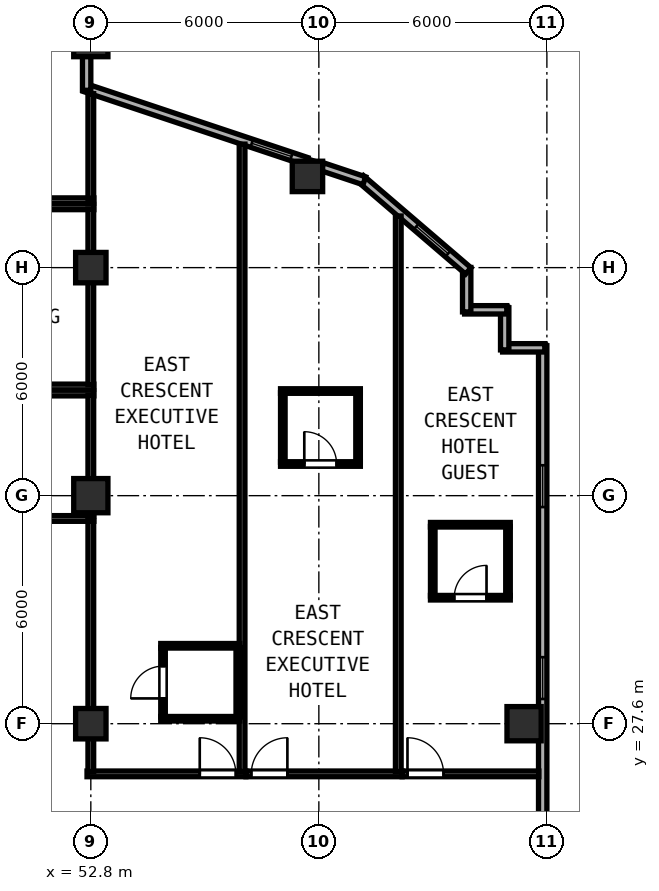
"""IFC4 building model, lengths in metres.
Left out: names, types, materials, properties, quantities, classifications, styles, units other than length and angle.
Written with IfcOpenShell. Run it as: python <this file> out.ifc"""

import sys

from ifc_helpers import new_model, si_unit, direction, frame, frame_2d, origin, origin_2d, place, context, subcontext, project, spatial, rectangle, hollow_rectangle, extrude, element, fill, save


model = new_model("IFC4")
c1 = context("Model", 3, precision=1e-05, world=origin(), true_north=direction((0.0, 1.0)))
c2 = subcontext(c1, "Body", "Model", "MODEL_VIEW")
j1 = project(units=[si_unit("LENGTHUNIT", "METRE"), si_unit("PLANEANGLEUNIT", "RADIAN")], contexts=[c1])
p1 = place(None, origin())
s1 = spatial("IfcSite", under=j1, at=p1, CompositionType="ELEMENT")
p2 = place(p1, origin())
s2 = spatial("IfcBuilding", under=s1, at=p2, CompositionType="ELEMENT")
p3 = place(p2, frame((0.0, 0.0, 191.8)))
s3 = spatial("IfcBuildingStorey", under=s2, at=p3, CompositionType="ELEMENT", Elevation=191.8)
for number, where, z_axis, x_axis in (
    (1, (52.8, 33.6, 0.0), (0.0, 0.0, 1.0), (1.0, 0.0, 0.0)),
    (2, (52.8, 45.6, 0.0), (0.0, 0.0, 1.0), (1.0, 0.0, 0.0)),
    (3, (64.2, 27.6, 0.0), (0.0, 0.0, 1.0), (1.0, 0.0, 0.0)),
):
    element("IfcColumn", number, at=place(p3, frame(where, z_axis=z_axis, x_axis=x_axis)), inside=s3, PredefinedType="COLUMN", context=c2, shape_type="SweptSolid", body=[
        extrude(hollow_rectangle(XDim=0.9, YDim=0.9, WallThickness=0.034, at=origin_2d()), origin(), (0.0, 0.0, 1.0), 3.8),
    ])
for number, where, z_axis, x_axis in (
    (4, (52.8, 27.6, 0.0), (0.0, 0.0, 1.0), (1.0, 0.0, 0.0)),
    (5, (52.8, 39.6, 0.0), (0.0, 0.0, 1.0), (1.0, 0.0, 0.0)),
    (6, (58.5, 42.0, 0.0), (0.0, 0.0, 1.0), (1.0, 0.0, 0.0)),
):
    element("IfcColumn", number, at=place(p3, frame(where, z_axis=z_axis, x_axis=x_axis)), inside=s3, PredefinedType="COLUMN", context=c2, shape_type="SweptSolid", body=[
        extrude(hollow_rectangle(XDim=0.8, YDim=0.8, WallThickness=0.03, at=origin_2d()), origin(), (0.0, 0.0, 1.0), 3.8),
    ])
p4 = place(p3, frame((64.69, 16.4, 0.0), z_axis=(0.0, 0.0, 1.0), x_axis=(0.0, 1.0, 0.0)))
e7 = element("IfcWall", 7, at=p4, inside=s3, PredefinedType="SOLIDWALL", context=c2, shape_type="SweptSolid", body=[
    extrude(rectangle(XDim=21.145, YDim=0.22, at=frame_2d((10.573, 0.0))), origin(), (0.0, 0.0, 1.0), 3.62),
])
p5 = place(p4, frame((1.05, 0.0, 0.85)))
e8 = element("IfcOpeningElement", 8, at=p5, cuts=e7, PredefinedType="OPENING", context=c2, shape_type="SweptSolid", body=[
    extrude(rectangle(XDim=1.1, YDim=1.75, at=frame_2d((0.55, 0.875))), frame((0.0, 0.12, 0.0), z_axis=(0.0, -1.0, 0.0), x_axis=(1.0, 0.0, 0.0)), (0.0, 0.0, 1.0), 0.24),
])
p6 = place(p4, frame((6.1, 0.0, 0.85)))
e9 = element("IfcOpeningElement", 9, at=p6, cuts=e7, PredefinedType="OPENING", context=c2, shape_type="SweptSolid", body=[
    extrude(rectangle(XDim=1.1, YDim=1.75, at=frame_2d((0.55, 0.875))), frame((0.0, 0.12, 0.0), z_axis=(0.0, -1.0, 0.0), x_axis=(1.0, 0.0, 0.0)), (0.0, 0.0, 1.0), 0.24),
])
p7 = place(p4, frame((11.85, 0.0, 0.85)))
e10 = element("IfcOpeningElement", 10, at=p7, cuts=e7, PredefinedType="OPENING", context=c2, shape_type="SweptSolid", body=[
    extrude(rectangle(XDim=1.1, YDim=1.75, at=frame_2d((0.55, 0.875))), frame((0.0, 0.12, 0.0), z_axis=(0.0, -1.0, 0.0), x_axis=(1.0, 0.0, 0.0)), (0.0, 0.0, 1.0), 0.24),
])
p8 = place(p4, frame((16.9, 0.0, 0.85)))
e11 = element("IfcOpeningElement", 11, at=p8, cuts=e7, PredefinedType="OPENING", context=c2, shape_type="SweptSolid", body=[
    extrude(rectangle(XDim=1.1, YDim=1.75, at=frame_2d((0.55, 0.875))), frame((0.0, 0.12, 0.0), z_axis=(0.0, -1.0, 0.0), x_axis=(1.0, 0.0, 0.0)), (0.0, 0.0, 1.0), 0.24),
])
p9 = place(p3, frame((64.745, 37.49, 0.0), z_axis=(0.0, 0.0, 1.0), x_axis=(-1.0, 0.0, 0.0)))
e12 = element("IfcWall", 12, at=p9, inside=s3, PredefinedType="SOLIDWALL", context=c2, shape_type="SweptSolid", body=[
    extrude(rectangle(XDim=1.11, YDim=0.22, at=frame_2d((0.555, 0.0))), origin(), (0.0, 0.0, 1.0), 3.62),
])
p10 = place(p3, frame((63.69, 37.435, 0.0), z_axis=(0.0, 0.0, 1.0), x_axis=(0.0, 1.0, 0.0)))
e13 = element("IfcWall", 13, at=p10, inside=s3, PredefinedType="SOLIDWALL", context=c2, shape_type="SweptSolid", body=[
    extrude(rectangle(XDim=1.11, YDim=0.22, at=frame_2d((0.555, 0.0))), origin(), (0.0, 0.0, 1.0), 3.62),
])
p11 = place(p3, frame((63.745, 38.49, 0.0), z_axis=(0.0, 0.0, 1.0), x_axis=(-1.0, 0.0, 0.0)))
e14 = element("IfcWall", 14, at=p11, inside=s3, PredefinedType="SOLIDWALL", context=c2, shape_type="SweptSolid", body=[
    extrude(rectangle(XDim=1.11, YDim=0.22, at=frame_2d((0.555, 0.0))), origin(), (0.0, 0.0, 1.0), 3.62),
])
p12 = place(p3, frame((62.69, 38.435, 0.0), z_axis=(0.0, 0.0, 1.0), x_axis=(0.0, 1.0, 0.0)))
e15 = element("IfcWall", 15, at=p12, inside=s3, PredefinedType="SOLIDWALL", context=c2, shape_type="SweptSolid", body=[
    extrude(rectangle(XDim=1.169, YDim=0.22, at=frame_2d((0.585, 0.0))), origin(), (0.0, 0.0, 1.0), 3.62),
])
p13 = place(p3, frame((62.732, 39.514, 0.0), z_axis=(0.0, 0.0, 1.0), x_axis=(-0.759251976569, 0.65079677018, 0.0)))
e16 = element("IfcWall", 16, at=p13, inside=s3, PredefinedType="SOLIDWALL", context=c2, shape_type="SweptSolid", body=[
    extrude(rectangle(XDim=3.726, YDim=0.22, at=frame_2d((1.863, 0.0))), origin(), (0.0, 0.0, 1.0), 3.62),
])
p14 = place(p13, frame((0.7, 0.0, 0.85)))
e17 = element("IfcOpeningElement", 17, at=p14, cuts=e16, PredefinedType="OPENING", context=c2, shape_type="SweptSolid", body=[
    extrude(rectangle(XDim=1.1, YDim=1.75, at=frame_2d((0.55, 0.875))), frame((0.0, 0.12, 0.0), z_axis=(0.0, -1.0, 0.0), x_axis=(1.0, 0.0, 0.0)), (0.0, 0.0, 1.0), 0.24),
])
p15 = place(p3, frame((59.997, 41.885, 0.0), z_axis=(0.0, 0.0, 1.0), x_axis=(-0.948662335685, 0.316290646166, 0.0)))
e18 = element("IfcWall", 18, at=p15, inside=s3, PredefinedType="SOLIDWALL", context=c2, shape_type="SweptSolid", body=[
    extrude(rectangle(XDim=1.165, YDim=0.22, at=frame_2d((0.583, 0.0))), origin(), (0.0, 0.0, 1.0), 3.62),
])
p16 = place(p3, frame((58.476, 42.392, 0.0), z_axis=(0.0, 0.0, 1.0), x_axis=(-0.948691231611, 0.316203964339, 0.0)))
e19 = element("IfcWall", 19, at=p16, inside=s3, PredefinedType="SOLIDWALL", context=c2, shape_type="SweptSolid", body=[
    extrude(rectangle(XDim=6.154, YDim=0.22, at=frame_2d((3.077, 0.0))), origin(), (0.0, 0.0, 1.0), 3.215),
])
p17 = place(p16, frame((0.419, 0.0, 0.85)))
e20 = element("IfcOpeningElement", 20, at=p17, cuts=e19, PredefinedType="OPENING", context=c2, shape_type="SweptSolid", body=[
    extrude(rectangle(XDim=1.1, YDim=1.75, at=frame_2d((0.55, 0.875))), frame((0.0, 0.12, 0.0), z_axis=(0.0, -1.0, 0.0), x_axis=(1.0, 0.0, 0.0)), (0.0, 0.0, 1.0), 0.24),
])
p18 = place(p3, frame((52.69, 44.266, 0.0), z_axis=(0.0, 0.0, 1.0), x_axis=(0.0, 1.0, 0.0)))
e21 = element("IfcWall", 21, at=p18, inside=s3, PredefinedType="SOLIDWALL", context=c2, shape_type="SweptSolid", body=[
    extrude(rectangle(XDim=0.892, YDim=0.22, at=frame_2d((0.446, 0.0))), origin(), (0.0, 0.0, 1.0), 3.215),
])
for number, where, z_axis, x_axis in (
    (22, (49.08, 36.3, 0.0), (0.0, 0.0, 1.0), (1.0, 0.0, 0.0)),
    (23, (49.08, 33.0, 0.0), (0.0, 0.0, 1.0), (1.0, 0.0, 0.0)),
):
    element("IfcWall", number, at=place(p3, frame(where, z_axis=z_axis, x_axis=x_axis)), inside=s3, PredefinedType="PARTITIONING", context=c2, shape_type="SweptSolid", body=[
        extrude(rectangle(XDim=3.8, YDim=0.15, at=frame_2d((1.9, 0.0))), origin(), (0.0, 0.0, 1.0), 3.62),
    ])
p19 = place(p3, frame((52.8, 33.06, 0.0), z_axis=(0.0, 0.0, 1.0), x_axis=(0.0, 1.0, 0.0)))
e24 = element("IfcWall", 24, at=p19, inside=s3, PredefinedType="PARTITIONING", context=c2, shape_type="SweptSolid", body=[
    extrude(rectangle(XDim=3.18, YDim=0.15, at=frame_2d((1.59, 0.0))), origin(), (0.0, 0.0, 1.0), 3.215),
])
for number, where, z_axis, x_axis in (
    (25, (49.08, 41.2, 0.0), (0.0, 0.0, 1.0), (1.0, 0.0, 0.0)),
    (26, (49.08, 36.46, 0.0), (0.0, 0.0, 1.0), (1.0, 0.0, 0.0)),
):
    element("IfcWall", number, at=place(p3, frame(where, z_axis=z_axis, x_axis=x_axis)), inside=s3, PredefinedType="PARTITIONING", context=c2, shape_type="SweptSolid", body=[
        extrude(rectangle(XDim=3.8, YDim=0.15, at=frame_2d((1.9, 0.0))), origin(), (0.0, 0.0, 1.0), 3.62),
    ])
p20 = place(p3, frame((52.8, 36.52, 0.0), z_axis=(0.0, 0.0, 1.0), x_axis=(0.0, 1.0, 0.0)))
e27 = element("IfcWall", 27, at=p20, inside=s3, PredefinedType="PARTITIONING", context=c2, shape_type="SweptSolid", body=[
    extrude(rectangle(XDim=4.62, YDim=0.15, at=frame_2d((2.31, 0.0))), origin(), (0.0, 0.0, 1.0), 3.215),
])
p21 = place(p3, frame((49.08, 41.36, 0.0), z_axis=(0.0, 0.0, 1.0), x_axis=(1.0, 0.0, 0.0)))
e28 = element("IfcWall", 28, at=p21, inside=s3, PredefinedType="PARTITIONING", context=c2, shape_type="SweptSolid", body=[
    extrude(rectangle(XDim=3.8, YDim=0.15, at=frame_2d((1.9, 0.0))), origin(), (0.0, 0.0, 1.0), 3.62),
])
p22 = place(p3, frame((52.8, 41.42, 0.0), z_axis=(0.0, 0.0, 1.0), x_axis=(0.0, 1.0, 0.0)))
e29 = element("IfcWall", 29, at=p22, inside=s3, PredefinedType="PARTITIONING", context=c2, shape_type="SweptSolid", body=[
    extrude(rectangle(XDim=2.757, YDim=0.15, at=frame_2d((1.378, 0.0))), origin(), (0.0, 0.0, 1.0), 3.215),
])
p23 = place(p3, frame((52.7, 26.28, 0.0), z_axis=(0.0, 0.0, 1.0), x_axis=(1.0, 0.0, 0.0)))
e30 = element("IfcWall", 30, at=p23, inside=s3, PredefinedType="PARTITIONING", context=c2, shape_type="SweptSolid", body=[
    extrude(rectangle(XDim=4.18, YDim=0.15, at=frame_2d((2.09, 0.0))), origin(), (0.0, 0.0, 1.0), 3.62),
])
p24 = place(p23, frame((2.966, 0.0, 0.0)))
e31 = element("IfcOpeningElement", 31, at=p24, cuts=e30, PredefinedType="OPENING", context=c2, shape_type="SweptSolid", body=[
    extrude(rectangle(XDim=0.95, YDim=2.18, at=frame_2d((0.475, 1.09))), frame((0.0, 0.085, 0.0), z_axis=(0.0, -1.0, 0.0), x_axis=(1.0, 0.0, 0.0)), (0.0, 0.0, 1.0), 0.17),
])
p25 = place(p3, frame((52.8, 26.34, 0.0), z_axis=(0.0, 0.0, 1.0), x_axis=(0.0, 1.0, 0.0)))
e32 = element("IfcWall", 32, at=p25, inside=s3, PredefinedType="PARTITIONING", context=c2, shape_type="SweptSolid", body=[
    extrude(rectangle(XDim=6.6, YDim=0.15, at=frame_2d((3.3, 0.0))), origin(), (0.0, 0.0, 1.0), 3.215),
])
p26 = place(p3, frame((56.78, 26.34, 0.0), z_axis=(0.0, 0.0, 1.0), x_axis=(0.0, 1.0, 0.0)))
e33 = element("IfcWall", 33, at=p26, inside=s3, PredefinedType="PARTITIONING", context=c2, shape_type="SweptSolid", body=[
    extrude(rectangle(XDim=16.51, YDim=0.15, at=frame_2d((8.255, 0.0))), origin(), (0.0, 0.0, 1.0), 3.62),
])
p27 = place(p3, frame((54.64, 29.65, 0.0), z_axis=(0.0, 0.0, 1.0), x_axis=(1.0, 0.0, 0.0)))
e34 = element("IfcWall", 34, at=p27, inside=s3, PredefinedType="PARTITIONING", context=c2, shape_type="SweptSolid", body=[
    extrude(rectangle(XDim=2.08, YDim=0.12, at=frame_2d((1.04, 0.0))), origin(), (0.0, 0.0, 1.0), 3.62),
])
p28 = place(p3, frame((54.64, 27.73, 0.0), z_axis=(0.0, 0.0, 1.0), x_axis=(1.0, 0.0, 0.0)))
e35 = element("IfcWall", 35, at=p28, inside=s3, PredefinedType="PARTITIONING", context=c2, shape_type="SweptSolid", body=[
    extrude(rectangle(XDim=2.08, YDim=0.12, at=frame_2d((1.04, 0.0))), origin(), (0.0, 0.0, 1.0), 3.215),
])
p29 = place(p3, frame((54.7, 27.775, 0.0), z_axis=(0.0, 0.0, 1.0), x_axis=(0.0, 1.0, 0.0)))
e36 = element("IfcWall", 36, at=p29, inside=s3, PredefinedType="PARTITIONING", context=c2, shape_type="SweptSolid", body=[
    extrude(rectangle(XDim=1.83, YDim=0.12, at=frame_2d((0.915, 0.0))), origin(), (0.0, 0.0, 1.0), 3.62),
])
p30 = place(p29, frame((1.34, 0.0, 0.0), z_axis=(0.0, 0.0, 1.0), x_axis=(-1.0, 0.0, 0.0)))
e37 = element("IfcOpeningElement", 37, at=p30, cuts=e36, PredefinedType="OPENING", context=c2, shape_type="SweptSolid", body=[
    extrude(rectangle(XDim=0.85, YDim=2.1, at=frame_2d((0.425, 1.05))), frame((0.0, 0.07, 0.0), z_axis=(0.0, -1.0, 0.0), x_axis=(1.0, 0.0, 0.0)), (0.0, 0.0, 1.0), 0.14),
])
p31 = place(p3, frame((56.68, 27.775, 0.0), z_axis=(0.0, 0.0, 1.0), x_axis=(0.0, 1.0, 0.0)))
e38 = element("IfcWall", 38, at=p31, inside=s3, PredefinedType="PARTITIONING", context=c2, shape_type="SweptSolid", body=[
    extrude(rectangle(XDim=1.83, YDim=0.12, at=frame_2d((0.915, 0.0))), origin(), (0.0, 0.0, 1.0), 3.62),
])
p32 = place(p3, frame((56.882, 26.28, 0.0), z_axis=(0.0, 0.0, 1.0), x_axis=(1.0, 0.0, 0.0)))
e39 = element("IfcWall", 39, at=p32, inside=s3, PredefinedType="PARTITIONING", context=c2, shape_type="SweptSolid", body=[
    extrude(rectangle(XDim=4.108, YDim=0.15, at=frame_2d((2.054, 0.0))), origin(), (0.0, 0.0, 1.0), 3.62),
])
p33 = place(p32, frame((0.14, 0.0, 0.0)))
e40 = element("IfcOpeningElement", 40, at=p33, cuts=e39, PredefinedType="OPENING", context=c2, shape_type="SweptSolid", body=[
    extrude(rectangle(XDim=0.95, YDim=2.18, at=frame_2d((0.475, 1.09))), frame((0.0, 0.085, 0.0), z_axis=(0.0, -1.0, 0.0), x_axis=(1.0, 0.0, 0.0)), (0.0, 0.0, 1.0), 0.17),
])
p34 = place(p3, frame((60.89, 26.34, 0.0), z_axis=(0.0, 0.0, 1.0), x_axis=(0.0, 1.0, 0.0)))
e41 = element("IfcWall", 41, at=p34, inside=s3, PredefinedType="PARTITIONING", context=c2, shape_type="SweptSolid", body=[
    extrude(rectangle(XDim=14.618, YDim=0.15, at=frame_2d((7.309, 0.0))), origin(), (0.0, 0.0, 1.0), 3.62),
])
p35 = place(p3, frame((57.792, 36.353, 0.0), z_axis=(0.0, 0.0, 1.0), x_axis=(1.0, 0.0, 0.0)))
e42 = element("IfcWall", 42, at=p35, inside=s3, PredefinedType="PARTITIONING", context=c2, shape_type="SweptSolid", body=[
    extrude(rectangle(XDim=2.1, YDim=0.12, at=frame_2d((1.05, 0.0))), origin(), (0.0, 0.0, 1.0), 3.62),
])
p36 = place(p3, frame((57.792, 34.433, 0.0), z_axis=(0.0, 0.0, 1.0), x_axis=(1.0, 0.0, 0.0)))
e43 = element("IfcWall", 43, at=p36, inside=s3, PredefinedType="PARTITIONING", context=c2, shape_type="SweptSolid", body=[
    extrude(rectangle(XDim=2.1, YDim=0.12, at=frame_2d((1.05, 0.0))), origin(), (0.0, 0.0, 1.0), 3.62),
])
p37 = place(p36, frame((0.625, 0.0, 0.0)))
e44 = element("IfcOpeningElement", 44, at=p37, cuts=e43, PredefinedType="OPENING", context=c2, shape_type="SweptSolid", body=[
    extrude(rectangle(XDim=0.85, YDim=2.1, at=frame_2d((0.425, 1.05))), frame((0.0, 0.07, 0.0), z_axis=(0.0, -1.0, 0.0), x_axis=(1.0, 0.0, 0.0)), (0.0, 0.0, 1.0), 0.14),
])
for number, where, z_axis, x_axis in (
    (45, (57.852, 34.478, 0.0), (0.0, 0.0, 1.0), (0.0, 1.0, 0.0)),
    (46, (59.832, 34.478, 0.0), (0.0, 0.0, 1.0), (0.0, 1.0, 0.0)),
):
    element("IfcWall", number, at=place(p3, frame(where, z_axis=z_axis, x_axis=x_axis)), inside=s3, PredefinedType="PARTITIONING", context=c2, shape_type="SweptSolid", body=[
        extrude(rectangle(XDim=1.83, YDim=0.12, at=frame_2d((0.915, 0.0))), origin(), (0.0, 0.0, 1.0), 3.62),
    ])
p38 = place(p3, frame((60.992, 26.28, 0.0), z_axis=(0.0, 0.0, 1.0), x_axis=(1.0, 0.0, 0.0)))
e47 = element("IfcWall", 47, at=p38, inside=s3, PredefinedType="PARTITIONING", context=c2, shape_type="SweptSolid", body=[
    extrude(rectangle(XDim=3.596, YDim=0.15, at=frame_2d((1.798, 0.0))), origin(), (0.0, 0.0, 1.0), 3.62),
])
p39 = place(p38, frame((0.14, 0.0, 0.0)))
e48 = element("IfcOpeningElement", 48, at=p39, cuts=e47, PredefinedType="OPENING", context=c2, shape_type="SweptSolid", body=[
    extrude(rectangle(XDim=0.95, YDim=2.15, at=frame_2d((0.475, 1.075))), frame((0.0, 0.085, 0.0), z_axis=(0.0, -1.0, 0.0), x_axis=(1.0, 0.0, 0.0)), (0.0, 0.0, 1.0), 0.17),
])
p40 = place(p3, frame((61.737, 32.835, 0.0), z_axis=(0.0, 0.0, 1.0), x_axis=(1.0, 0.0, 0.0)))
e49 = element("IfcWall", 49, at=p40, inside=s3, PredefinedType="PARTITIONING", context=c2, shape_type="SweptSolid", body=[
    extrude(rectangle(XDim=2.1, YDim=0.12, at=frame_2d((1.05, 0.0))), origin(), (0.0, 0.0, 1.0), 3.62),
])
p41 = place(p3, frame((61.737, 30.915, 0.0), z_axis=(0.0, 0.0, 1.0), x_axis=(1.0, 0.0, 0.0)))
e50 = element("IfcWall", 50, at=p41, inside=s3, PredefinedType="PARTITIONING", context=c2, shape_type="SweptSolid", body=[
    extrude(rectangle(XDim=2.1, YDim=0.12, at=frame_2d((1.05, 0.0))), origin(), (0.0, 0.0, 1.0), 3.62),
])
p42 = place(p41, frame((0.625, 0.0, 0.0)))
e51 = element("IfcOpeningElement", 51, at=p42, cuts=e50, PredefinedType="OPENING", context=c2, shape_type="SweptSolid", body=[
    extrude(rectangle(XDim=0.85, YDim=2.1, at=frame_2d((0.425, 1.05))), frame((0.0, 0.07, 0.0), z_axis=(0.0, -1.0, 0.0), x_axis=(1.0, 0.0, 0.0)), (0.0, 0.0, 1.0), 0.14),
])
for number, where, z_axis, x_axis in (
    (52, (61.797, 30.96, 0.0), (0.0, 0.0, 1.0), (0.0, 1.0, 0.0)),
    (53, (63.777, 30.96, 0.0), (0.0, 0.0, 1.0), (0.0, 1.0, 0.0)),
):
    element("IfcWall", number, at=place(p3, frame(where, z_axis=z_axis, x_axis=x_axis)), inside=s3, PredefinedType="PARTITIONING", context=c2, shape_type="SweptSolid", body=[
        extrude(rectangle(XDim=1.83, YDim=0.12, at=frame_2d((0.915, 0.0))), origin(), (0.0, 0.0, 1.0), 3.62),
    ])
p43 = place(p7, origin())
e54 = element("IfcWindow", 54, at=p43, inside=s3, PartitioningType="SINGLE_PANEL", PredefinedType="WINDOW", context=c2, shape_type="SweptSolid", body=[
    extrude(rectangle(XDim=1.1, YDim=1.75, at=frame_2d((0.55, 0.875))), frame((0.0, 0.03, 0.0), z_axis=(0.0, -1.0, 0.0), x_axis=(1.0, 0.0, 0.0)), (0.0, 0.0, 1.0), 0.06),
])
fill(e10, e54)
p44 = place(p8, origin())
e55 = element("IfcWindow", 55, at=p44, inside=s3, PartitioningType="SINGLE_PANEL", PredefinedType="WINDOW", context=c2, shape_type="SweptSolid", body=[
    extrude(rectangle(XDim=1.1, YDim=1.75, at=frame_2d((0.55, 0.875))), frame((0.0, 0.03, 0.0), z_axis=(0.0, -1.0, 0.0), x_axis=(1.0, 0.0, 0.0)), (0.0, 0.0, 1.0), 0.06),
])
fill(e11, e55)
p45 = place(p14, origin())
e56 = element("IfcWindow", 56, at=p45, inside=s3, PartitioningType="SINGLE_PANEL", PredefinedType="WINDOW", context=c2, shape_type="SweptSolid", body=[
    extrude(rectangle(XDim=1.1, YDim=1.75, at=frame_2d((0.55, 0.875))), frame((0.0, 0.03, 0.0), z_axis=(0.0, -1.0, 0.0), x_axis=(1.0, 0.0, 0.0)), (0.0, 0.0, 1.0), 0.06),
])
fill(e17, e56)
p46 = place(p17, origin())
e57 = element("IfcWindow", 57, at=p46, inside=s3, PartitioningType="SINGLE_PANEL", PredefinedType="WINDOW", context=c2, shape_type="SweptSolid", body=[
    extrude(rectangle(XDim=1.1, YDim=1.75, at=frame_2d((0.55, 0.875))), frame((0.0, 0.03, 0.0), z_axis=(0.0, -1.0, 0.0), x_axis=(1.0, 0.0, 0.0)), (0.0, 0.0, 1.0), 0.06),
])
fill(e20, e57)
p47 = place(p24, origin())
e58 = element("IfcDoor", 58, at=p47, inside=s3, OperationType="SINGLE_SWING_LEFT", PredefinedType="DOOR", context=c2, shape_type="SweptSolid", body=[
    extrude(rectangle(XDim=0.95, YDim=2.18, at=frame_2d((0.475, 1.09))), frame((0.0, 0.025, 0.0), z_axis=(0.0, -1.0, 0.0), x_axis=(1.0, 0.0, 0.0)), (0.0, 0.0, 1.0), 0.05),
])
fill(e31, e58)
p48 = place(p30, origin())
e59 = element("IfcDoor", 59, at=p48, inside=s3, OperationType="SINGLE_SWING_RIGHT", PredefinedType="DOOR", context=c2, shape_type="SweptSolid", body=[
    extrude(rectangle(XDim=0.85, YDim=2.1, at=frame_2d((0.425, 1.05))), frame((0.0, 0.025, 0.0), z_axis=(0.0, -1.0, 0.0), x_axis=(1.0, 0.0, 0.0)), (0.0, 0.0, 1.0), 0.05),
])
fill(e37, e59)
p49 = place(p33, origin())
e60 = element("IfcDoor", 60, at=p49, inside=s3, OperationType="SINGLE_SWING_RIGHT", PredefinedType="DOOR", context=c2, shape_type="SweptSolid", body=[
    extrude(rectangle(XDim=0.95, YDim=2.18, at=frame_2d((0.475, 1.09))), frame((0.0, 0.025, 0.0), z_axis=(0.0, -1.0, 0.0), x_axis=(1.0, 0.0, 0.0)), (0.0, 0.0, 1.0), 0.05),
])
fill(e40, e60)
p50 = place(p37, origin())
e61 = element("IfcDoor", 61, at=p50, inside=s3, OperationType="SINGLE_SWING_LEFT", PredefinedType="DOOR", context=c2, shape_type="SweptSolid", body=[
    extrude(rectangle(XDim=0.85, YDim=2.1, at=frame_2d((0.425, 1.05))), frame((0.0, 0.025, 0.0), z_axis=(0.0, -1.0, 0.0), x_axis=(1.0, 0.0, 0.0)), (0.0, 0.0, 1.0), 0.05),
])
fill(e44, e61)
p51 = place(p39, origin())
e62 = element("IfcDoor", 62, at=p51, inside=s3, OperationType="SINGLE_SWING_LEFT", PredefinedType="DOOR", context=c2, shape_type="SweptSolid", body=[
    extrude(rectangle(XDim=0.95, YDim=2.15, at=frame_2d((0.475, 1.075))), frame((0.0, 0.025, 0.0), z_axis=(0.0, -1.0, 0.0), x_axis=(1.0, 0.0, 0.0)), (0.0, 0.0, 1.0), 0.05),
])
fill(e48, e62)
p52 = place(p42, origin())
e63 = element("IfcDoor", 63, at=p52, inside=s3, OperationType="SINGLE_SWING_RIGHT", PredefinedType="DOOR", context=c2, shape_type="SweptSolid", body=[
    extrude(rectangle(XDim=0.85, YDim=2.1, at=frame_2d((0.425, 1.05))), frame((0.0, 0.025, 0.0), z_axis=(0.0, -1.0, 0.0), x_axis=(1.0, 0.0, 0.0)), (0.0, 0.0, 1.0), 0.05),
])
fill(e51, e63)
save(model, sys.argv[1])
